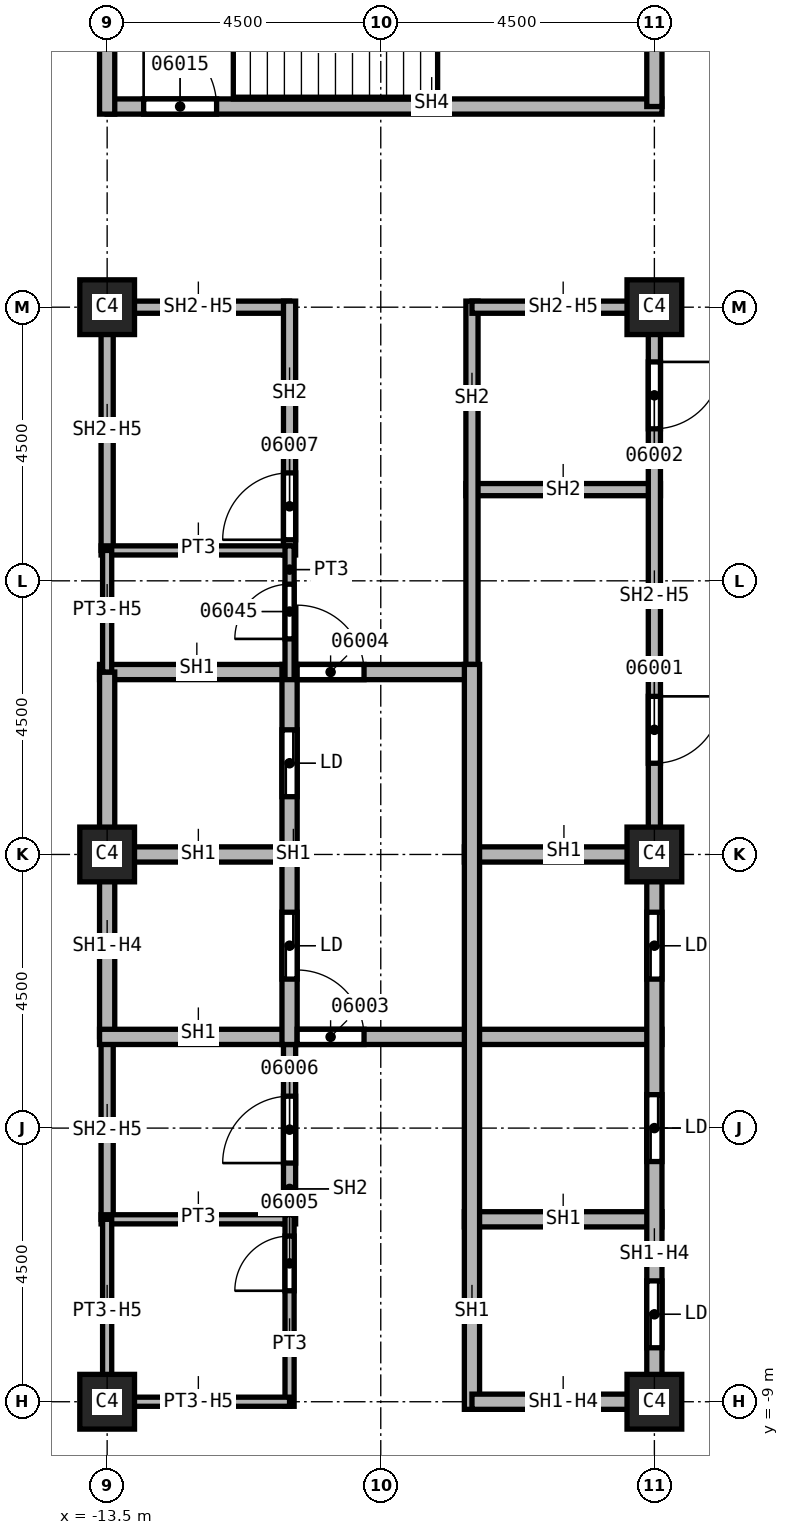
"""IFC4 building model, lengths in metres.
Left out: names, types, materials, properties, quantities, classifications, styles, units other than length and angle.
Written with IfcOpenShell. Run it as: python <this file> out.ifc"""

import sys

from ifc_helpers import new_model, si_unit, direction, frame, frame_2d, origin, origin_2d, place, context, subcontext, project, spatial, rectangle, extrude, element, fill, save


model = new_model("IFC4")
c1 = context("Model", 3, precision=1e-05, world=origin(), true_north=direction((0.0, 1.0)))
c2 = subcontext(c1, "Body", "Model", "MODEL_VIEW")
j1 = project(units=[si_unit("LENGTHUNIT", "METRE"), si_unit("PLANEANGLEUNIT", "RADIAN")], contexts=[c1])
p1 = place(None, origin())
s1 = spatial("IfcSite", under=j1, at=p1, CompositionType="ELEMENT")
p2 = place(p1, origin())
s2 = spatial("IfcBuilding", under=s1, at=p2, CompositionType="ELEMENT")
p3 = place(p2, frame((0.0, 0.0, 126.0)))
s3 = spatial("IfcBuildingStorey", under=s2, at=p3, CompositionType="ELEMENT", Elevation=126.0)
for number, where, z_axis, x_axis in (
    (1, (-4.5, 0.0, 0.0), (0.0, 0.0, 1.0), (1.0, 0.0, 0.0)),
    (2, (-4.5, 9.0, 0.0), (0.0, 0.0, 1.0), (1.0, 0.0, 0.0)),
    (3, (-4.5, -9.0, 0.0), (0.0, 0.0, 1.0), (1.0, 0.0, 0.0)),
    (4, (-13.5, 0.0, 0.0), (0.0, 0.0, 1.0), (1.0, 0.0, 0.0)),
    (5, (-13.5, 9.0, 0.0), (0.0, 0.0, 1.0), (1.0, 0.0, 0.0)),
    (6, (-13.5, -9.0, 0.0), (0.0, 0.0, 1.0), (1.0, 0.0, 0.0)),
):
    element("IfcColumn", number, at=place(p3, frame(where, z_axis=z_axis, x_axis=x_axis)), inside=s3, PredefinedType="COLUMN", context=c2, shape_type="SweptSolid", body=[
        extrude(rectangle(XDim=0.9, YDim=0.9, at=origin_2d()), origin(), (0.0, 0.0, 1.0), 3.7),
    ])
p4 = place(p3, frame((-13.5, -6.0, 0.0), z_axis=(0.0, 0.0, 1.0), x_axis=(0.0, 1.0, 0.0)))
e7 = element("IfcWall", 7, at=p4, inside=s3, PredefinedType="SOLIDWALL", context=c2, shape_type="SweptSolid", body=[
    extrude(rectangle(XDim=3.0, YDim=0.2, at=frame_2d((1.5, 0.0))), origin(), (0.0, 0.0, 1.0), 2.938),
])
p5 = place(p3, frame((-13.5, 5.0, 0.0), z_axis=(0.0, 0.0, 1.0), x_axis=(0.0, 1.0, 0.0)))
e8 = element("IfcWall", 8, at=p5, inside=s3, PredefinedType="SOLIDWALL", context=c2, shape_type="SweptSolid", body=[
    extrude(rectangle(XDim=4.1, YDim=0.2, at=frame_2d((2.05, 0.0))), origin(), (0.0, 0.0, 1.0), 2.938),
])
p6 = place(p3, frame((-13.5, 9.0, 0.0), z_axis=(0.0, 0.0, 1.0), x_axis=(1.0, 0.0, 0.0)))
e9 = element("IfcWall", 9, at=p6, inside=s3, PredefinedType="SOLIDWALL", context=c2, shape_type="SweptSolid", body=[
    extrude(rectangle(XDim=3.0, YDim=0.2, at=frame_2d((1.5, 0.0))), origin(), (0.0, 0.0, 1.0), 2.938),
])
p7 = place(p3, frame((-10.5, -6.075, 0.0), z_axis=(0.0, 0.0, 1.0), x_axis=(0.0, 1.0, 0.0)))
e10 = element("IfcWall", 10, at=p7, inside=s3, PredefinedType="SOLIDWALL", context=c2, shape_type="SweptSolid", body=[
    extrude(rectangle(XDim=3.2, YDim=0.2, at=frame_2d((1.6, 0.0))), origin(), (0.0, 0.0, 1.0), 3.7),
])
p8 = place(p7, frame((1.0, 0.0, 0.0)))
e11 = element("IfcOpeningElement", 11, at=p8, cuts=e10, PredefinedType="OPENING", context=c2, shape_type="SweptSolid", body=[
    extrude(rectangle(XDim=1.1, YDim=2.1, at=frame_2d((0.55, 1.05))), frame((0.0, 0.1, 0.0), z_axis=(0.0, -1.0, 0.0), x_axis=(1.0, 0.0, 0.0)), (0.0, 0.0, 1.0), 0.2),
])
p9 = place(p3, frame((-10.5, 4.925, 0.0), z_axis=(0.0, 0.0, 1.0), x_axis=(0.0, 1.0, 0.0)))
e12 = element("IfcWall", 12, at=p9, inside=s3, PredefinedType="SOLIDWALL", context=c2, shape_type="SweptSolid", body=[
    extrude(rectangle(XDim=4.175, YDim=0.2, at=frame_2d((2.087, 0.0))), origin(), (0.0, 0.0, 1.0), 3.7),
])
p10 = place(p9, frame((0.25, 0.0, 0.0)))
e13 = element("IfcOpeningElement", 13, at=p10, cuts=e12, PredefinedType="OPENING", context=c2, shape_type="SweptSolid", body=[
    extrude(rectangle(XDim=1.1, YDim=2.1, at=frame_2d((0.55, 1.05))), frame((0.0, 0.1, 0.0), z_axis=(0.0, -1.0, 0.0), x_axis=(1.0, 0.0, 0.0)), (0.0, 0.0, 1.0), 0.2),
])
p11 = place(p3, frame((-7.6, 6.0, 0.0), z_axis=(0.0, 0.0, 1.0), x_axis=(1.0, 0.0, 0.0)))
e14 = element("IfcWall", 14, at=p11, inside=s3, PredefinedType="SOLIDWALL", context=c2, shape_type="SweptSolid", body=[
    extrude(rectangle(XDim=3.2, YDim=0.2, at=frame_2d((1.6, 0.0))), origin(), (0.0, 0.0, 1.0), 3.7),
])
p12 = place(p3, frame((-7.5, 2.875, 0.0), z_axis=(0.0, 0.0, 1.0), x_axis=(0.0, 1.0, 0.0)))
e15 = element("IfcWall", 15, at=p12, inside=s3, PredefinedType="SOLIDWALL", context=c2, shape_type="SweptSolid", body=[
    extrude(rectangle(XDim=6.225, YDim=0.2, at=frame_2d((3.113, 0.0))), origin(), (0.0, 0.0, 1.0), 3.7),
])
p13 = place(p3, frame((-7.5, 9.0, 0.0), z_axis=(0.0, 0.0, 1.0), x_axis=(1.0, 0.0, 0.0)))
e16 = element("IfcWall", 16, at=p13, inside=s3, PredefinedType="SOLIDWALL", context=c2, shape_type="SweptSolid", body=[
    extrude(rectangle(XDim=3.0, YDim=0.2, at=frame_2d((1.5, 0.0))), origin(), (0.0, 0.0, 1.0), 2.938),
])
p14 = place(p3, frame((-4.5, 9.1, 0.0), z_axis=(0.0, 0.0, 1.0), x_axis=(0.0, -1.0, 0.0)))
e17 = element("IfcWall", 17, at=p14, inside=s3, PredefinedType="SOLIDWALL", context=c2, shape_type="SweptSolid", body=[
    extrude(rectangle(XDim=9.1, YDim=0.2, at=frame_2d((4.55, 0.0))), origin(), (0.0, 0.0, 1.0), 2.938),
])
p15 = place(p14, frame((6.5, 0.0, 0.0)))
e18 = element("IfcOpeningElement", 18, at=p15, cuts=e17, PredefinedType="OPENING", context=c2, shape_type="SweptSolid", body=[
    extrude(rectangle(XDim=1.1, YDim=2.1, at=frame_2d((0.55, 1.05))), frame((0.0, 0.1, 0.0), z_axis=(0.0, -1.0, 0.0), x_axis=(1.0, 0.0, 0.0)), (0.0, 0.0, 1.0), 0.2),
])
p16 = place(p14, frame((1.0, 0.0, 0.0)))
e19 = element("IfcOpeningElement", 19, at=p16, cuts=e17, PredefinedType="OPENING", context=c2, shape_type="SweptSolid", body=[
    extrude(rectangle(XDim=1.1, YDim=2.1, at=frame_2d((0.55, 1.05))), frame((0.0, 0.1, 0.0), z_axis=(0.0, -1.0, 0.0), x_axis=(1.0, 0.0, 0.0)), (0.0, 0.0, 1.0), 0.2),
])
p17 = place(p3, frame((-13.625, 0.0, 0.0), z_axis=(0.0, 0.0, 1.0), x_axis=(1.0, 0.0, 0.0)))
e20 = element("IfcWall", 20, at=p17, inside=s3, PredefinedType="SOLIDWALL", context=c2, shape_type="SweptSolid", body=[
    extrude(rectangle(XDim=3.125, YDim=0.25, at=frame_2d((1.562, 0.0))), origin(), (0.0, 0.0, 1.0), 3.7),
])
p18 = place(p3, frame((-13.625, 3.0, 0.0), z_axis=(0.0, 0.0, 1.0), x_axis=(1.0, 0.0, 0.0)))
e21 = element("IfcWall", 21, at=p18, inside=s3, PredefinedType="SOLIDWALL", context=c2, shape_type="SweptSolid", body=[
    extrude(rectangle(XDim=6.125, YDim=0.25, at=frame_2d((3.062, 0.0))), origin(), (0.0, 0.0, 1.0), 3.7),
])
p19 = place(p18, frame((3.25, 0.0, 0.0)))
e22 = element("IfcOpeningElement", 22, at=p19, cuts=e21, PredefinedType="OPENING", context=c2, shape_type="SweptSolid", body=[
    extrude(rectangle(XDim=1.1, YDim=2.1, at=frame_2d((0.55, 1.05))), frame((0.0, 0.125, 0.0), z_axis=(0.0, -1.0, 0.0), x_axis=(1.0, 0.0, 0.0)), (0.0, 0.0, 1.0), 0.25),
])
p20 = place(p3, frame((-13.5, -3.0, 0.0), z_axis=(0.0, 0.0, 1.0), x_axis=(0.0, 1.0, 0.0)))
e23 = element("IfcWall", 23, at=p20, inside=s3, PredefinedType="SOLIDWALL", context=c2, shape_type="SweptSolid", body=[
    extrude(rectangle(XDim=6.0, YDim=0.25, at=frame_2d((3.0, 0.0))), origin(), (0.0, 0.0, 1.0), 2.938),
])
p21 = place(p3, frame((-13.625, -3.0, 0.0), z_axis=(0.0, 0.0, 1.0), x_axis=(1.0, 0.0, 0.0)))
e24 = element("IfcWall", 24, at=p21, inside=s3, PredefinedType="SOLIDWALL", context=c2, shape_type="SweptSolid", body=[
    extrude(rectangle(XDim=9.25, YDim=0.25, at=frame_2d((4.625, 0.0))), origin(), (0.0, 0.0, 1.0), 3.7),
])
p22 = place(p21, frame((3.25, 0.0, 0.0)))
e25 = element("IfcOpeningElement", 25, at=p22, cuts=e24, PredefinedType="OPENING", context=c2, shape_type="SweptSolid", body=[
    extrude(rectangle(XDim=1.1, YDim=2.1, at=frame_2d((0.55, 1.05))), frame((0.0, 0.125, 0.0), z_axis=(0.0, -1.0, 0.0), x_axis=(1.0, 0.0, 0.0)), (0.0, 0.0, 1.0), 0.25),
])
p23 = place(p3, frame((-10.5, -3.125, 0.0), z_axis=(0.0, 0.0, 1.0), x_axis=(0.0, 1.0, 0.0)))
e26 = element("IfcWall", 26, at=p23, inside=s3, PredefinedType="SOLIDWALL", context=c2, shape_type="SweptSolid", body=[
    extrude(rectangle(XDim=6.25, YDim=0.25, at=frame_2d((3.125, 0.0))), origin(), (0.0, 0.0, 1.0), 3.7),
])
p24 = place(p23, frame((1.075, 0.0, 0.0)))
e27 = element("IfcOpeningElement", 27, at=p24, cuts=e26, PredefinedType="OPENING", context=c2, shape_type="SweptSolid", body=[
    extrude(rectangle(XDim=1.1, YDim=2.1, at=frame_2d((0.55, 1.05))), frame((0.0, 0.125, 0.0), z_axis=(0.0, -1.0, 0.0), x_axis=(1.0, 0.0, 0.0)), (0.0, 0.0, 1.0), 0.25),
])
p25 = place(p23, frame((4.075, 0.0, 0.0)))
e28 = element("IfcOpeningElement", 28, at=p25, cuts=e26, PredefinedType="OPENING", context=c2, shape_type="SweptSolid", body=[
    extrude(rectangle(XDim=1.1, YDim=2.1, at=frame_2d((0.55, 1.05))), frame((0.0, 0.125, 0.0), z_axis=(0.0, -1.0, 0.0), x_axis=(1.0, 0.0, 0.0)), (0.0, 0.0, 1.0), 0.25),
])
for number, where, z_axis, x_axis in (
    (29, (-7.625, -6.0, 0.0), (0.0, 0.0, 1.0), (1.0, 0.0, 0.0)),
    (30, (-7.625, 0.0, 0.0), (0.0, 0.0, 1.0), (1.0, 0.0, 0.0)),
):
    element("IfcWall", number, at=place(p3, frame(where, z_axis=z_axis, x_axis=x_axis)), inside=s3, PredefinedType="SOLIDWALL", context=c2, shape_type="SweptSolid", body=[
        extrude(rectangle(XDim=3.25, YDim=0.25, at=frame_2d((1.625, 0.0))), origin(), (0.0, 0.0, 1.0), 3.7),
    ])
p26 = place(p3, frame((-7.5, -9.125, 0.0), z_axis=(0.0, 0.0, 1.0), x_axis=(0.0, 1.0, 0.0)))
e31 = element("IfcWall", 31, at=p26, inside=s3, PredefinedType="SOLIDWALL", context=c2, shape_type="SweptSolid", body=[
    extrude(rectangle(XDim=12.25, YDim=0.25, at=frame_2d((6.125, 0.0))), origin(), (0.0, 0.0, 1.0), 3.7),
])
p27 = place(p3, frame((-4.5, -9.0, 0.0), z_axis=(0.0, 0.0, 1.0), x_axis=(-1.0, 0.0, 0.0)))
e32 = element("IfcWall", 32, at=p27, inside=s3, PredefinedType="SOLIDWALL", context=c2, shape_type="SweptSolid", body=[
    extrude(rectangle(XDim=3.0, YDim=0.25, at=frame_2d((1.5, 0.0))), origin(), (0.0, 0.0, 1.0), 2.938),
])
p28 = place(p3, frame((-4.5, 0.0, 0.0), z_axis=(0.0, 0.0, 1.0), x_axis=(0.0, -1.0, 0.0)))
e33 = element("IfcWall", 33, at=p28, inside=s3, PredefinedType="SOLIDWALL", context=c2, shape_type="SweptSolid", body=[
    extrude(rectangle(XDim=9.125, YDim=0.25, at=frame_2d((4.562, 0.0))), origin(), (0.0, 0.0, 1.0), 2.938),
])
p29 = place(p28, frame((7.012, 0.0, 0.0)))
e34 = element("IfcOpeningElement", 34, at=p29, cuts=e33, PredefinedType="OPENING", context=c2, shape_type="SweptSolid", body=[
    extrude(rectangle(XDim=1.1, YDim=2.1, at=frame_2d((0.55, 1.05))), frame((0.0, 0.125, 0.0), z_axis=(0.0, -1.0, 0.0), x_axis=(1.0, 0.0, 0.0)), (0.0, 0.0, 1.0), 0.25),
])
p30 = place(p28, frame((3.95, 0.0, 0.0)))
e35 = element("IfcOpeningElement", 35, at=p30, cuts=e33, PredefinedType="OPENING", context=c2, shape_type="SweptSolid", body=[
    extrude(rectangle(XDim=1.1, YDim=2.1, at=frame_2d((0.55, 1.05))), frame((0.0, 0.125, 0.0), z_axis=(0.0, -1.0, 0.0), x_axis=(1.0, 0.0, 0.0)), (0.0, 0.0, 1.0), 0.25),
])
p31 = place(p28, frame((0.95, 0.0, 0.0)))
e36 = element("IfcOpeningElement", 36, at=p31, cuts=e33, PredefinedType="OPENING", context=c2, shape_type="SweptSolid", body=[
    extrude(rectangle(XDim=1.1, YDim=2.1, at=frame_2d((0.55, 1.05))), frame((0.0, 0.125, 0.0), z_axis=(0.0, -1.0, 0.0), x_axis=(1.0, 0.0, 0.0)), (0.0, 0.0, 1.0), 0.25),
])
p32 = place(p3, frame((-13.5, 12.3, 0.0), z_axis=(0.0, 0.0, 1.0), x_axis=(1.0, 0.0, 0.0)))
e37 = element("IfcWall", 37, at=p32, inside=s3, PredefinedType="SOLIDWALL", context=c2, shape_type="SweptSolid", body=[
    extrude(rectangle(XDim=9.125, YDim=0.25, at=frame_2d((4.562, 0.0))), origin(), (0.0, 0.0, 1.0), 3.7),
])
p33 = place(p32, frame((0.6, 0.0, 0.0)))
e38 = element("IfcOpeningElement", 38, at=p33, cuts=e37, PredefinedType="OPENING", context=c2, shape_type="SweptSolid", body=[
    extrude(rectangle(XDim=1.2, YDim=2.1, at=frame_2d((0.6, 1.05))), frame((0.0, 0.125, 0.0), z_axis=(0.0, -1.0, 0.0), x_axis=(1.0, 0.0, 0.0)), (0.0, 0.0, 1.0), 0.25),
])
p34 = place(p3, frame((-13.5, 12.175, 0.0), z_axis=(0.0, 0.0, 1.0), x_axis=(0.0, 1.0, 0.0)))
e39 = element("IfcWall", 39, at=p34, inside=s3, PredefinedType="SOLIDWALL", context=c2, shape_type="SweptSolid", body=[
    extrude(rectangle(XDim=4.75, YDim=0.25, at=frame_2d((2.375, 0.0))), origin(), (0.0, 0.0, 1.0), 3.7),
])
p35 = place(p3, frame((-4.5, 16.8, 0.0), z_axis=(0.0, 0.0, 1.0), x_axis=(0.0, -1.0, 0.0)))
e40 = element("IfcWall", 40, at=p35, inside=s3, PredefinedType="SOLIDWALL", context=c2, shape_type="SweptSolid", body=[
    extrude(rectangle(XDim=4.5, YDim=0.25, at=frame_2d((2.25, 0.0))), origin(), (0.0, 0.0, 1.0), 3.7),
])
for number, where, z_axis, x_axis in (
    (41, (-13.6, -6.0, 0.0), (0.0, 0.0, 1.0), (1.0, 0.0, 0.0)),
    (42, (-13.6, 5.0, 0.0), (0.0, 0.0, 1.0), (1.0, 0.0, 0.0)),
):
    element("IfcWall", number, at=place(p3, frame(where, z_axis=z_axis, x_axis=x_axis)), inside=s3, PredefinedType="PARTITIONING", context=c2, shape_type="SweptSolid", body=[
        extrude(rectangle(XDim=3.1, YDim=0.15, at=frame_2d((1.55, 0.0))), origin(), (0.0, 0.0, 1.0), 3.7),
    ])
p36 = place(p3, frame((-13.5, -9.075, 0.0), z_axis=(0.0, 0.0, 1.0), x_axis=(0.0, 1.0, 0.0)))
e43 = element("IfcWall", 43, at=p36, inside=s3, PredefinedType="PARTITIONING", context=c2, shape_type="SweptSolid", body=[
    extrude(rectangle(XDim=3.075, YDim=0.15, at=frame_2d((1.538, 0.0))), origin(), (0.0, 0.0, 1.0), 2.938),
])
p37 = place(p3, frame((-13.5, 3.0, 0.0), z_axis=(0.0, 0.0, 1.0), x_axis=(0.0, 1.0, 0.0)))
e44 = element("IfcWall", 44, at=p37, inside=s3, PredefinedType="PARTITIONING", context=c2, shape_type="SweptSolid", body=[
    extrude(rectangle(XDim=2.0, YDim=0.15, at=frame_2d((1.0, 0.0))), origin(), (0.0, 0.0, 1.0), 2.938),
])
p38 = place(p3, frame((-10.5, -9.075, 0.0), z_axis=(0.0, 0.0, 1.0), x_axis=(0.0, 1.0, 0.0)))
e45 = element("IfcWall", 45, at=p38, inside=s3, PredefinedType="PARTITIONING", context=c2, shape_type="SweptSolid", body=[
    extrude(rectangle(XDim=3.15, YDim=0.15, at=frame_2d((1.575, 0.0))), origin(), (0.0, 0.0, 1.0), 3.7),
])
p39 = place(p38, frame((1.9, 0.0, 0.0)))
e46 = element("IfcOpeningElement", 46, at=p39, cuts=e45, PredefinedType="OPENING", context=c2, shape_type="SweptSolid", body=[
    extrude(rectangle(XDim=0.9, YDim=2.1, at=frame_2d((0.45, 1.05))), frame((0.0, 0.075, 0.0), z_axis=(0.0, -1.0, 0.0), x_axis=(1.0, 0.0, 0.0)), (0.0, 0.0, 1.0), 0.15),
])
p40 = place(p3, frame((-10.5, -9.0, 0.0), z_axis=(0.0, 0.0, 1.0), x_axis=(-1.0, 0.0, 0.0)))
e47 = element("IfcWall", 47, at=p40, inside=s3, PredefinedType="PARTITIONING", context=c2, shape_type="SweptSolid", body=[
    extrude(rectangle(XDim=3.0, YDim=0.15, at=frame_2d((1.5, 0.0))), origin(), (0.0, 0.0, 1.0), 2.938),
])
p41 = place(p3, frame((-10.5, 2.875, 0.0), z_axis=(0.0, 0.0, 1.0), x_axis=(0.0, 1.0, 0.0)))
e48 = element("IfcWall", 48, at=p41, inside=s3, PredefinedType="PARTITIONING", context=c2, shape_type="SweptSolid", body=[
    extrude(rectangle(XDim=2.2, YDim=0.15, at=frame_2d((1.1, 0.0))), origin(), (0.0, 0.0, 1.0), 3.7),
])
p42 = place(p41, frame((0.67, 0.0, 0.0)))
e49 = element("IfcOpeningElement", 49, at=p42, cuts=e48, PredefinedType="OPENING", context=c2, shape_type="SweptSolid", body=[
    extrude(rectangle(XDim=0.9, YDim=2.1, at=frame_2d((0.45, 1.05))), frame((0.0, 0.075, 0.0), z_axis=(0.0, -1.0, 0.0), x_axis=(1.0, 0.0, 0.0)), (0.0, 0.0, 1.0), 0.15),
])
p43 = place(p15, origin())
e50 = element("IfcDoor", 50, at=p43, inside=s3, OperationType="SINGLE_SWING_RIGHT", PredefinedType="DOOR", context=c2, shape_type="SweptSolid", body=[
    extrude(rectangle(XDim=1.1, YDim=2.1, at=frame_2d((0.55, 1.05))), frame((0.0, 0.025, 0.0), z_axis=(0.0, -1.0, 0.0), x_axis=(1.0, 0.0, 0.0)), (0.0, 0.0, 1.0), 0.05),
])
fill(e18, e50)
p44 = place(p16, origin())
e51 = element("IfcDoor", 51, at=p44, inside=s3, OperationType="SINGLE_SWING_LEFT", PredefinedType="DOOR", context=c2, shape_type="SweptSolid", body=[
    extrude(rectangle(XDim=1.1, YDim=2.1, at=frame_2d((0.55, 1.05))), frame((0.0, 0.025, 0.0), z_axis=(0.0, -1.0, 0.0), x_axis=(1.0, 0.0, 0.0)), (0.0, 0.0, 1.0), 0.05),
])
fill(e19, e51)
p45 = place(p22, origin())
e52 = element("IfcDoor", 52, at=p45, inside=s3, OperationType="SINGLE_SWING_RIGHT", PredefinedType="DOOR", context=c2, shape_type="SweptSolid", body=[
    extrude(rectangle(XDim=1.1, YDim=2.1, at=frame_2d((0.55, 1.05))), frame((0.0, 0.025, 0.0), z_axis=(0.0, -1.0, 0.0), x_axis=(1.0, 0.0, 0.0)), (0.0, 0.0, 1.0), 0.05),
])
fill(e25, e52)
p46 = place(p19, origin())
e53 = element("IfcDoor", 53, at=p46, inside=s3, OperationType="SINGLE_SWING_LEFT", PredefinedType="DOOR", context=c2, shape_type="SweptSolid", body=[
    extrude(rectangle(XDim=1.1, YDim=2.1, at=frame_2d((0.55, 1.05))), frame((0.0, 0.025, 0.0), z_axis=(0.0, -1.0, 0.0), x_axis=(1.0, 0.0, 0.0)), (0.0, 0.0, 1.0), 0.05),
])
fill(e22, e53)
p47 = place(p39, origin())
e54 = element("IfcDoor", 54, at=p47, inside=s3, OperationType="SINGLE_SWING_RIGHT", PredefinedType="DOOR", context=c2, shape_type="SweptSolid", body=[
    extrude(rectangle(XDim=0.9, YDim=2.1, at=frame_2d((0.45, 1.05))), frame((0.0, 0.025, 0.0), z_axis=(0.0, -1.0, 0.0), x_axis=(1.0, 0.0, 0.0)), (0.0, 0.0, 1.0), 0.05),
])
fill(e46, e54)
p48 = place(p8, origin())
e55 = element("IfcDoor", 55, at=p48, inside=s3, OperationType="SINGLE_SWING_LEFT", PredefinedType="DOOR", context=c2, shape_type="SweptSolid", body=[
    extrude(rectangle(XDim=1.1, YDim=2.1, at=frame_2d((0.55, 1.05))), frame((0.0, 0.025, 0.0), z_axis=(0.0, -1.0, 0.0), x_axis=(1.0, 0.0, 0.0)), (0.0, 0.0, 1.0), 0.05),
])
fill(e11, e55)
p49 = place(p10, origin())
e56 = element("IfcDoor", 56, at=p49, inside=s3, OperationType="SINGLE_SWING_RIGHT", PredefinedType="DOOR", context=c2, shape_type="SweptSolid", body=[
    extrude(rectangle(XDim=1.1, YDim=2.1, at=frame_2d((0.55, 1.05))), frame((0.0, 0.025, 0.0), z_axis=(0.0, -1.0, 0.0), x_axis=(1.0, 0.0, 0.0)), (0.0, 0.0, 1.0), 0.05),
])
fill(e13, e56)
p50 = place(p33, origin())
e57 = element("IfcDoor", 57, at=p50, inside=s3, OperationType="SINGLE_SWING_RIGHT", PredefinedType="DOOR", context=c2, shape_type="SweptSolid", body=[
    extrude(rectangle(XDim=1.2, YDim=2.1, at=frame_2d((0.6, 1.05))), frame((0.0, 0.025, 0.0), z_axis=(0.0, -1.0, 0.0), x_axis=(1.0, 0.0, 0.0)), (0.0, 0.0, 1.0), 0.05),
])
fill(e38, e57)
p51 = place(p42, origin())
e58 = element("IfcDoor", 58, at=p51, inside=s3, OperationType="SINGLE_SWING_LEFT", PredefinedType="DOOR", context=c2, shape_type="SweptSolid", body=[
    extrude(rectangle(XDim=0.9, YDim=2.1, at=frame_2d((0.45, 1.05))), frame((0.0, 0.025, 0.0), z_axis=(0.0, -1.0, 0.0), x_axis=(1.0, 0.0, 0.0)), (0.0, 0.0, 1.0), 0.05),
])
fill(e49, e58)
p52 = place(p29, origin())
e59 = element("IfcDoor", 59, at=p52, inside=s3, OperationType="SLIDING_TO_LEFT", PredefinedType="DOOR", context=c2, shape_type="SweptSolid", body=[
    extrude(rectangle(XDim=1.1, YDim=2.1, at=frame_2d((0.55, 1.05))), frame((0.0, 0.025, 0.0), z_axis=(0.0, -1.0, 0.0), x_axis=(1.0, 0.0, 0.0)), (0.0, 0.0, 1.0), 0.05),
])
fill(e34, e59)
p53 = place(p30, origin())
e60 = element("IfcDoor", 60, at=p53, inside=s3, OperationType="SLIDING_TO_LEFT", PredefinedType="DOOR", context=c2, shape_type="SweptSolid", body=[
    extrude(rectangle(XDim=1.1, YDim=2.1, at=frame_2d((0.55, 1.05))), frame((0.0, 0.025, 0.0), z_axis=(0.0, -1.0, 0.0), x_axis=(1.0, 0.0, 0.0)), (0.0, 0.0, 1.0), 0.05),
])
fill(e35, e60)
p54 = place(p31, origin())
e61 = element("IfcDoor", 61, at=p54, inside=s3, OperationType="SLIDING_TO_LEFT", PredefinedType="DOOR", context=c2, shape_type="SweptSolid", body=[
    extrude(rectangle(XDim=1.1, YDim=2.1, at=frame_2d((0.55, 1.05))), frame((0.0, 0.025, 0.0), z_axis=(0.0, -1.0, 0.0), x_axis=(1.0, 0.0, 0.0)), (0.0, 0.0, 1.0), 0.05),
])
fill(e36, e61)
p55 = place(p24, origin())
e62 = element("IfcDoor", 62, at=p55, inside=s3, OperationType="SLIDING_TO_LEFT", PredefinedType="DOOR", context=c2, shape_type="SweptSolid", body=[
    extrude(rectangle(XDim=1.1, YDim=2.1, at=frame_2d((0.55, 1.05))), frame((0.0, 0.025, 0.0), z_axis=(0.0, -1.0, 0.0), x_axis=(1.0, 0.0, 0.0)), (0.0, 0.0, 1.0), 0.05),
])
fill(e27, e62)
p56 = place(p25, origin())
e63 = element("IfcDoor", 63, at=p56, inside=s3, OperationType="SLIDING_TO_LEFT", PredefinedType="DOOR", context=c2, shape_type="SweptSolid", body=[
    extrude(rectangle(XDim=1.1, YDim=2.1, at=frame_2d((0.55, 1.05))), frame((0.0, 0.025, 0.0), z_axis=(0.0, -1.0, 0.0), x_axis=(1.0, 0.0, 0.0)), (0.0, 0.0, 1.0), 0.05),
])
fill(e28, e63)
save(model, sys.argv[1])
